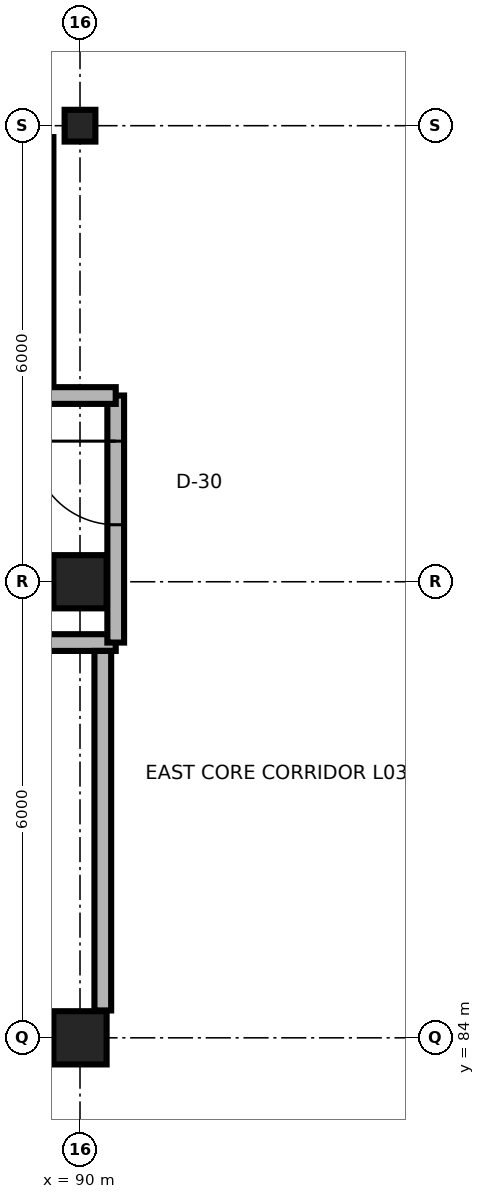
"""IFC4 building model, lengths in metres.
Left out: names, types, materials, properties, quantities, classifications, styles, units other than length and angle.
Written with IfcOpenShell. Run it as: python <this file> out.ifc"""

import sys

from ifc_helpers import new_model, si_unit, direction, frame, frame_2d, origin, origin_2d, place, context, subcontext, project, spatial, rectangle, i_section, extrude, element, fill, save


model = new_model("IFC4")
c1 = context("Model", 3, precision=1e-05, world=origin(), true_north=direction((0.0, 1.0)))
c2 = subcontext(c1, "Body", "Model", "MODEL_VIEW")
j1 = project(units=[si_unit("LENGTHUNIT", "METRE"), si_unit("PLANEANGLEUNIT", "RADIAN")], contexts=[c1])
p1 = place(None, origin())
s1 = spatial("IfcSite", under=j1, at=p1, CompositionType="ELEMENT")
p2 = place(p1, origin())
s2 = spatial("IfcBuilding", under=s1, at=p2, CompositionType="ELEMENT")
p3 = place(p2, frame((0.0, 0.0, 12.0)))
s3 = spatial("IfcBuildingStorey", under=s2, at=p3, CompositionType="ELEMENT", Elevation=12.0)
for number, where, z_axis, x_axis in (
    (1, (90.0, 84.0, 0.0), (0.0, 0.0, 1.0), (1.0, 0.0, 0.0)),
    (2, (90.0, 90.0, 0.0), (0.0, 0.0, 1.0), (1.0, 0.0, 0.0)),
):
    element("IfcColumn", number, at=place(p3, frame(where, z_axis=z_axis, x_axis=x_axis)), inside=s3, PredefinedType="COLUMN", context=c2, shape_type="SweptSolid", body=[
        extrude(rectangle(XDim=0.7, YDim=0.7, at=origin_2d()), origin(), (0.0, 0.0, 1.0), 4.5),
    ])
p4 = place(p3, frame((90.0, 96.0, 0.0), z_axis=(0.0, 0.0, 1.0), x_axis=(1.0, 0.0, 0.0)))
e3 = element("IfcColumn", 3, at=p4, inside=s3, PredefinedType="COLUMN", context=c2, shape_type="SweptSolid", body=[
    extrude(i_section(OverallWidth=0.405, OverallDepth=0.418, WebThickness=0.02, FlangeThickness=0.03, FilletRadius=0.022, at=origin_2d()), origin(), (0.0, 0.0, 1.0), 4.5),
])
p5 = place(p3, frame((89.5, 92.45, 0.0), z_axis=(0.0, 0.0, 1.0), x_axis=(0.0, 1.0, 0.0)))
e4 = element("IfcWall", 4, at=p5, inside=s3, PredefinedType="SHEAR", context=c2, shape_type="SweptSolid", body=[
    extrude(rectangle(XDim=3.4, YDim=0.3, at=frame_2d((1.7, 0.0))), origin(), (0.0, 0.0, 1.0), 4.22),
])
p6 = place(p3, frame((87.8, 84.0, 0.0), z_axis=(0.0, 0.0, 1.0), x_axis=(1.0, 0.0, 0.0)))
e5 = element("IfcWall", 5, at=p6, inside=s3, PredefinedType="PARTITIONING", context=c2, shape_type="SweptSolid", body=[
    extrude(rectangle(XDim=2.5, YDim=0.22, at=frame_2d((1.25, 0.0))), origin(), (0.0, 0.0, 1.0), 3.738),
])
p7 = place(p6, frame((0.75, 0.0, 0.0)))
e6 = element("IfcOpeningElement", 6, at=p7, cuts=e5, PredefinedType="OPENING", context=c2, shape_type="SweptSolid", body=[
    extrude(rectangle(XDim=1.0, YDim=2.15, at=frame_2d((0.5, 1.075))), frame((0.0, 0.125, 0.0), z_axis=(0.0, -1.0, 0.0), x_axis=(1.0, 0.0, 0.0)), (0.0, 0.0, 1.0), 0.25),
])
p8 = place(p3, frame((80.6, 89.2, 0.0), z_axis=(0.0, 0.0, 1.0), x_axis=(1.0, 0.0, 0.0)))
e7 = element("IfcWall", 7, at=p8, inside=s3, PredefinedType="PARTITIONING", context=c2, shape_type="SweptSolid", body=[
    extrude(rectangle(XDim=9.87, YDim=0.22, at=frame_2d((4.935, 0.0))), origin(), (0.0, 0.0, 1.0), 4.22),
])
p9 = place(p3, frame((90.47, 89.2, 0.0), z_axis=(0.0, 0.0, 1.0), x_axis=(0.0, 1.0, 0.0)))
e8 = element("IfcWall", 8, at=p9, inside=s3, PredefinedType="PARTITIONING", context=c2, shape_type="SweptSolid", body=[
    extrude(rectangle(XDim=3.25, YDim=0.22, at=frame_2d((1.625, 0.0))), origin(), (0.0, 0.0, 1.0), 4.22),
])
p10 = place(p9, frame((1.55, 0.0, 0.0)))
e9 = element("IfcOpeningElement", 9, at=p10, cuts=e8, PredefinedType="OPENING", context=c2, shape_type="SweptSolid", body=[
    extrude(rectangle(XDim=1.1, YDim=2.15, at=frame_2d((0.55, 1.075))), frame((0.0, 0.125, 0.0), z_axis=(0.0, -1.0, 0.0), x_axis=(1.0, 0.0, 0.0)), (0.0, 0.0, 1.0), 0.25),
])
p11 = place(p3, frame((90.3, 84.36, 0.0), z_axis=(0.0, 0.0, 1.0), x_axis=(0.0, 1.0, 0.0)))
e10 = element("IfcWall", 10, at=p11, inside=s3, PredefinedType="PARTITIONING", context=c2, shape_type="SweptSolid", body=[
    extrude(rectangle(XDim=4.73, YDim=0.22, at=frame_2d((2.365, 0.0))), origin(), (0.0, 0.0, 1.0), 4.22),
])
p12 = place(p3, frame((89.5, 92.45, 0.0), z_axis=(0.0, 0.0, 1.0), x_axis=(1.0, 0.0, 0.0)))
e11 = element("IfcWall", 11, at=p12, inside=s3, PredefinedType="PARTITIONING", context=c2, shape_type="SweptSolid", body=[
    extrude(rectangle(XDim=0.97, YDim=0.22, at=frame_2d((0.485, 0.0))), origin(), (0.0, 0.0, 1.0), 4.22),
])
p13 = place(p10, origin())
e12 = element("IfcDoor", 12, at=p13, inside=s3, OperationType="SINGLE_SWING_RIGHT", PredefinedType="DOOR", context=c2, shape_type="SweptSolid", body=[
    extrude(rectangle(XDim=1.1, YDim=2.15, at=frame_2d((0.55, 1.075))), frame((0.0, 0.025, 0.0), z_axis=(0.0, -1.0, 0.0), x_axis=(1.0, 0.0, 0.0)), (0.0, 0.0, 1.0), 0.05),
])
fill(e9, e12)
save(model, sys.argv[1])
